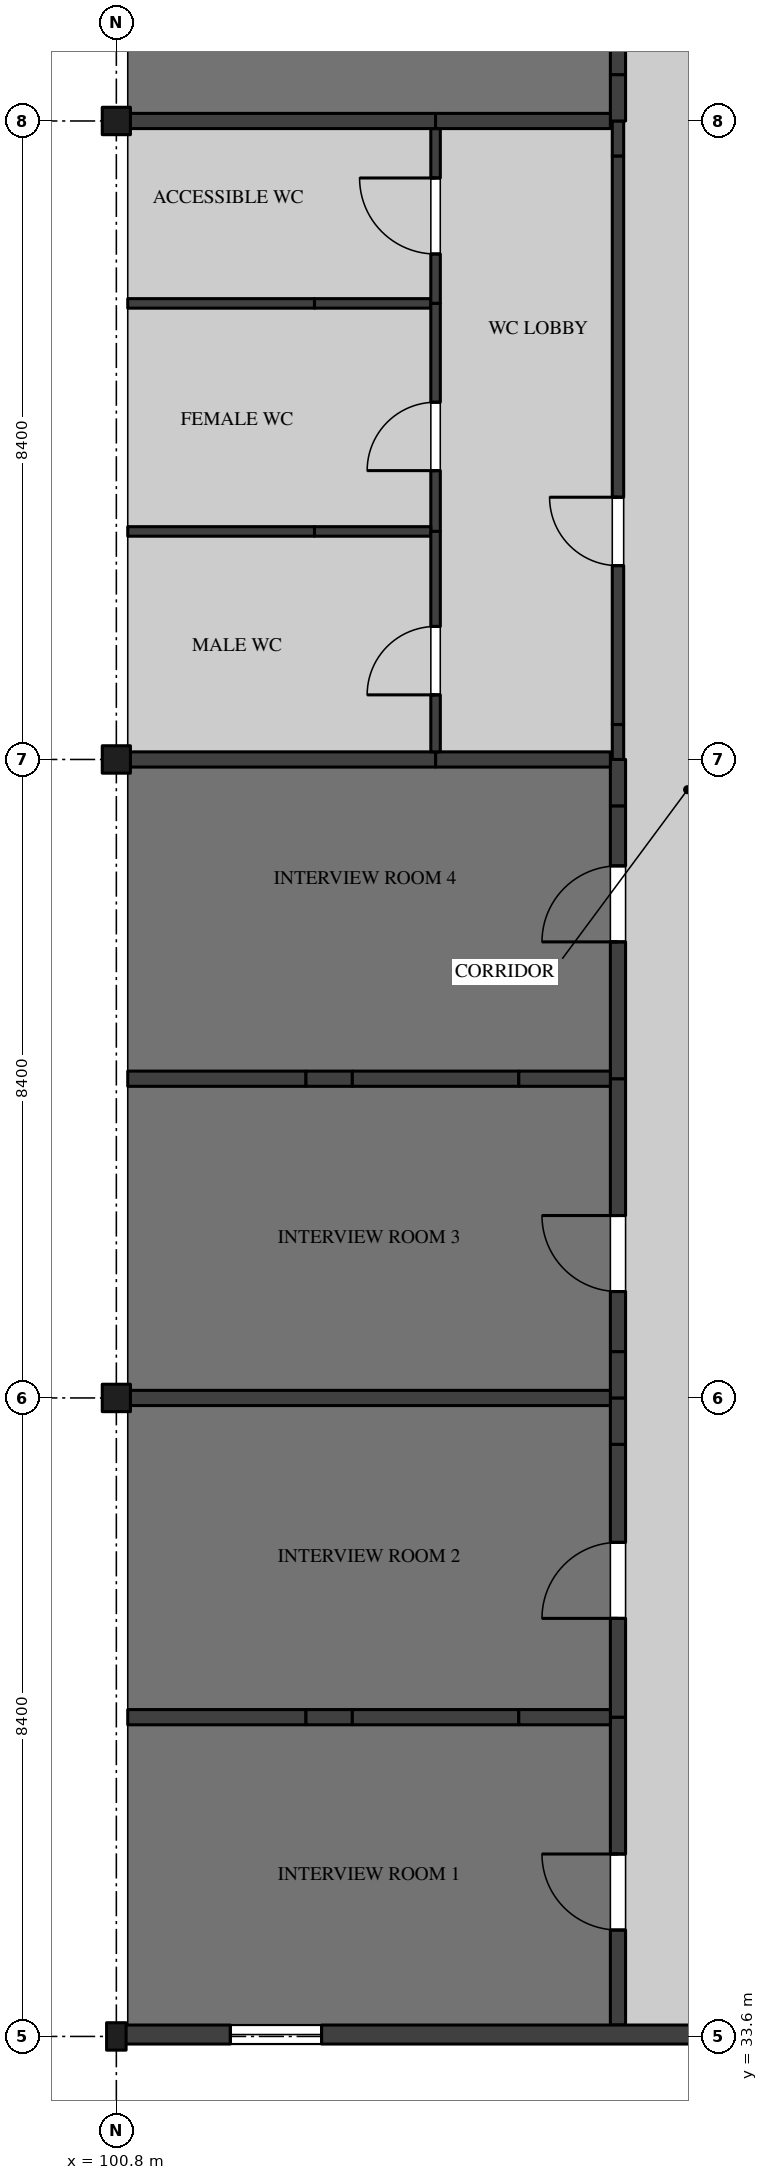
"""IFC4 building model, lengths in metres.
Left out: names, types, materials, properties, quantities, classifications, styles, units other than length and angle.
Written with IfcOpenShell. Run it as: python <this file> out.ifc"""

import sys

from ifc_helpers import new_model, si_unit, direction, frame, frame_2d, origin, origin_2d, place, context, subcontext, project, spatial, rectangle, i_section, extrude, element, fill, save


model = new_model("IFC4")
c1 = context("Model", 3, precision=1e-05, world=origin(), true_north=direction((0.0, 1.0)))
c2 = subcontext(c1, "Body", "Model", "MODEL_VIEW")
j1 = project(units=[si_unit("LENGTHUNIT", "METRE"), si_unit("PLANEANGLEUNIT", "RADIAN")], contexts=[c1])
p1 = place(None, origin())
s1 = spatial("IfcSite", under=j1, at=p1, CompositionType="ELEMENT")
p2 = place(p1, origin())
s2 = spatial("IfcBuilding", under=s1, at=p2, CompositionType="ELEMENT")
p3 = place(p2, frame((0.0, 0.0, 32.4)))
s3 = spatial("IfcBuildingStorey", under=s2, at=p3, CompositionType="ELEMENT", Elevation=32.4)
p4 = place(p3, frame((100.8, 33.6, 0.0), z_axis=(0.0, 0.0, 1.0), x_axis=(1.0, 0.0, 0.0)))
e1 = element("IfcColumn", 1, at=p4, inside=s3, PredefinedType="COLUMN", context=c2, shape_type="SweptSolid", body=[
    extrude(i_section(OverallWidth=0.257, OverallDepth=0.361, WebThickness=0.011, FlangeThickness=0.02, FilletRadius=0.015, at=origin_2d()), origin(), (0.0, 0.0, 1.0), 4.37),
])
for number, where, z_axis, x_axis in (
    (2, (100.8, 42.0, 0.0), (0.0, 0.0, 1.0), (1.0, 0.0, 0.0)),
    (3, (100.8, 50.4, 0.0), (0.0, 0.0, 1.0), (1.0, 0.0, 0.0)),
    (4, (100.8, 58.8, 0.0), (0.0, 0.0, 1.0), (1.0, 0.0, 0.0)),
):
    element("IfcColumn", number, at=place(p3, frame(where, z_axis=z_axis, x_axis=x_axis)), inside=s3, PredefinedType="COLUMN", context=c2, shape_type="SweptSolid", body=[
        extrude(i_section(OverallWidth=0.371, OverallDepth=0.361, WebThickness=0.012, FlangeThickness=0.02, FilletRadius=0.015, at=origin_2d()), origin(), (0.0, 0.0, 1.0), 4.37),
    ])
p5 = place(p3, frame((107.4, 33.75, 0.0), z_axis=(0.0, 0.0, 1.0), x_axis=(0.0, 1.0, 0.0)))
e5 = element("IfcWall", 5, at=p5, inside=s3, PredefinedType="PARTITIONING", context=c2, shape_type="SweptSolid", body=[
    extrude(rectangle(XDim=4.05, YDim=0.2, at=frame_2d((2.025, 0.0))), origin(), (0.0, 0.0, 1.0), 4.37),
])
p6 = place(p5, frame((1.25, 0.0, 0.0)))
e6 = element("IfcOpeningElement", 6, at=p6, cuts=e5, PredefinedType="OPENING", context=c2, shape_type="SweptSolid", body=[
    extrude(rectangle(XDim=1.0, YDim=2.1, at=frame_2d((0.5, 1.05))), frame((0.0, 0.11, 0.0), z_axis=(0.0, -1.0, 0.0), x_axis=(1.0, 0.0, 0.0)), (0.0, 0.0, 1.0), 0.22),
])
p7 = place(p3, frame((107.4, 37.8, 0.0), z_axis=(0.0, 0.0, 1.0), x_axis=(0.0, 1.0, 0.0)))
e7 = element("IfcWall", 7, at=p7, inside=s3, PredefinedType="PARTITIONING", context=c2, shape_type="SweptSolid", body=[
    extrude(rectangle(XDim=3.59, YDim=0.2, at=frame_2d((1.795, 0.0))), origin(), (0.0, 0.0, 1.0), 4.37),
])
p8 = place(p7, frame((1.3, 0.0, 0.0)))
e8 = element("IfcOpeningElement", 8, at=p8, cuts=e7, PredefinedType="OPENING", context=c2, shape_type="SweptSolid", body=[
    extrude(rectangle(XDim=1.0, YDim=2.1, at=frame_2d((0.5, 1.05))), frame((0.0, 0.11, 0.0), z_axis=(0.0, -1.0, 0.0), x_axis=(1.0, 0.0, 0.0)), (0.0, 0.0, 1.0), 0.22),
])
for number, where, z_axis, x_axis in (
    (9, (107.4, 41.39, 0.0), (0.0, 0.0, 1.0), (0.0, 1.0, 0.0)),
    (10, (107.4, 42.0, 0.0), (0.0, 0.0, 1.0), (0.0, 1.0, 0.0)),
):
    element("IfcWall", number, at=place(p3, frame(where, z_axis=z_axis, x_axis=x_axis)), inside=s3, PredefinedType="PARTITIONING", context=c2, shape_type="SweptSolid", body=[
        extrude(rectangle(XDim=0.61, YDim=0.2, at=frame_2d((0.305, 0.0))), origin(), (0.0, 0.0, 1.0), 3.746),
    ])
p9 = place(p3, frame((107.4, 42.61, 0.0), z_axis=(0.0, 0.0, 1.0), x_axis=(0.0, 1.0, 0.0)))
e11 = element("IfcWall", 11, at=p9, inside=s3, PredefinedType="PARTITIONING", context=c2, shape_type="SweptSolid", body=[
    extrude(rectangle(XDim=3.59, YDim=0.2, at=frame_2d((1.795, 0.0))), origin(), (0.0, 0.0, 1.0), 4.37),
])
p10 = place(p9, frame((0.79, 0.0, 0.0)))
e12 = element("IfcOpeningElement", 12, at=p10, cuts=e11, PredefinedType="OPENING", context=c2, shape_type="SweptSolid", body=[
    extrude(rectangle(XDim=1.0, YDim=2.1, at=frame_2d((0.5, 1.05))), frame((0.0, 0.11, 0.0), z_axis=(0.0, -1.0, 0.0), x_axis=(1.0, 0.0, 0.0)), (0.0, 0.0, 1.0), 0.22),
])
p11 = place(p3, frame((107.4, 46.2, 0.0), z_axis=(0.0, 0.0, 1.0), x_axis=(0.0, 1.0, 0.0)))
e13 = element("IfcWall", 13, at=p11, inside=s3, PredefinedType="PARTITIONING", context=c2, shape_type="SweptSolid", body=[
    extrude(rectangle(XDim=3.59, YDim=0.2, at=frame_2d((1.795, 0.0))), origin(), (0.0, 0.0, 1.0), 4.37),
])
p12 = place(p11, frame((1.8, 0.0, 0.0)))
e14 = element("IfcOpeningElement", 14, at=p12, cuts=e13, PredefinedType="OPENING", context=c2, shape_type="SweptSolid", body=[
    extrude(rectangle(XDim=1.0, YDim=2.1, at=frame_2d((0.5, 1.05))), frame((0.0, 0.11, 0.0), z_axis=(0.0, -1.0, 0.0), x_axis=(1.0, 0.0, 0.0)), (0.0, 0.0, 1.0), 0.22),
])
p13 = place(p3, frame((107.4, 49.79, 0.0), z_axis=(0.0, 0.0, 1.0), x_axis=(0.0, 1.0, 0.0)))
e15 = element("IfcWall", 15, at=p13, inside=s3, PredefinedType="PARTITIONING", context=c2, shape_type="SweptSolid", body=[
    extrude(rectangle(XDim=0.61, YDim=0.2, at=frame_2d((0.305, 0.0))), origin(), (0.0, 0.0, 1.0), 3.746),
])
p14 = place(p3, frame((107.4, 50.4, 0.0), z_axis=(0.0, 0.0, 1.0), x_axis=(0.0, 1.0, 0.0)))
e16 = element("IfcWall", 16, at=p14, inside=s3, PredefinedType="PARTITIONING", context=c2, shape_type="SweptSolid", body=[
    extrude(rectangle(XDim=0.46, YDim=0.15, at=frame_2d((0.23, 0.0))), origin(), (0.0, 0.0, 1.0), 3.746),
])
p15 = place(p3, frame((107.4, 50.86, 0.0), z_axis=(0.0, 0.0, 1.0), x_axis=(0.0, 1.0, 0.0)))
e17 = element("IfcWall", 17, at=p15, inside=s3, PredefinedType="PARTITIONING", context=c2, shape_type="SweptSolid", body=[
    extrude(rectangle(XDim=7.48, YDim=0.15, at=frame_2d((3.74, 0.0))), origin(), (0.0, 0.0, 1.0), 4.37),
])
p16 = place(p15, frame((2.09, 0.0, 0.0)))
e18 = element("IfcOpeningElement", 18, at=p16, cuts=e17, PredefinedType="OPENING", context=c2, shape_type="SweptSolid", body=[
    extrude(rectangle(XDim=0.9, YDim=2.1, at=frame_2d((0.45, 1.05))), frame((0.0, 0.085, 0.0), z_axis=(0.0, -1.0, 0.0), x_axis=(1.0, 0.0, 0.0)), (0.0, 0.0, 1.0), 0.17),
])
p17 = place(p3, frame((107.4, 58.34, 0.0), z_axis=(0.0, 0.0, 1.0), x_axis=(0.0, 1.0, 0.0)))
e19 = element("IfcWall", 19, at=p17, inside=s3, PredefinedType="PARTITIONING", context=c2, shape_type="SweptSolid", body=[
    extrude(rectangle(XDim=0.46, YDim=0.15, at=frame_2d((0.23, 0.0))), origin(), (0.0, 0.0, 1.0), 3.746),
])
p18 = place(p3, frame((107.4, 58.8, 0.0), z_axis=(0.0, 0.0, 1.0), x_axis=(0.0, 1.0, 0.0)))
e20 = element("IfcWall", 20, at=p18, inside=s3, PredefinedType="PARTITIONING", context=c2, shape_type="SweptSolid", body=[
    extrude(rectangle(XDim=0.61, YDim=0.2, at=frame_2d((0.305, 0.0))), origin(), (0.0, 0.0, 1.0), 3.746),
])
p19 = place(p3, frame((107.4, 59.41, 0.0), z_axis=(0.0, 0.0, 1.0), x_axis=(0.0, 1.0, 0.0)))
e21 = element("IfcWall", 21, at=p19, inside=s3, PredefinedType="PARTITIONING", context=c2, shape_type="SweptSolid", body=[
    extrude(rectangle(XDim=7.64, YDim=0.2, at=frame_2d((3.82, 0.0))), origin(), (0.0, 0.0, 1.0), 4.37),
])
p20 = place(p19, frame((3.09, 0.0, 0.0)))
e22 = element("IfcOpeningElement", 22, at=p20, cuts=e21, PredefinedType="OPENING", context=c2, shape_type="SweptSolid", body=[
    extrude(rectangle(XDim=1.0, YDim=2.1, at=frame_2d((0.5, 1.05))), frame((0.0, 0.11, 0.0), z_axis=(0.0, -1.0, 0.0), x_axis=(1.0, 0.0, 0.0)), (0.0, 0.0, 1.0), 0.22),
])
p21 = place(p3, frame((100.95, 37.8, 0.0), z_axis=(0.0, 0.0, 1.0), x_axis=(1.0, 0.0, 0.0)))
e23 = element("IfcWall", 23, at=p21, inside=s3, PredefinedType="PARTITIONING", context=c2, shape_type="SweptSolid", body=[
    extrude(rectangle(XDim=2.345, YDim=0.2, at=frame_2d((1.172, 0.0))), origin(), (0.0, 0.0, 1.0), 4.37),
])
p22 = place(p3, frame((103.295, 37.8, 0.0), z_axis=(0.0, 0.0, 1.0), x_axis=(1.0, 0.0, 0.0)))
e24 = element("IfcWall", 24, at=p22, inside=s3, PredefinedType="PARTITIONING", context=c2, shape_type="SweptSolid", body=[
    extrude(rectangle(XDim=0.61, YDim=0.2, at=frame_2d((0.305, 0.0))), origin(), (0.0, 0.0, 1.0), 3.895),
])
p23 = place(p3, frame((103.905, 37.8, 0.0), z_axis=(0.0, 0.0, 1.0), x_axis=(1.0, 0.0, 0.0)))
e25 = element("IfcWall", 25, at=p23, inside=s3, PredefinedType="PARTITIONING", context=c2, shape_type="SweptSolid", body=[
    extrude(rectangle(XDim=2.19, YDim=0.2, at=frame_2d((1.095, 0.0))), origin(), (0.0, 0.0, 1.0), 4.37),
])
p24 = place(p3, frame((106.095, 37.8, 0.0), z_axis=(0.0, 0.0, 1.0), x_axis=(1.0, 0.0, 0.0)))
e26 = element("IfcWall", 26, at=p24, inside=s3, PredefinedType="PARTITIONING", context=c2, shape_type="SweptSolid", body=[
    extrude(rectangle(XDim=1.205, YDim=0.2, at=frame_2d((0.603, 0.0))), origin(), (0.0, 0.0, 1.0), 3.895),
])
p25 = place(p3, frame((100.986, 42.0, 0.0), z_axis=(0.0, 0.0, 1.0), x_axis=(1.0, 0.0, 0.0)))
e27 = element("IfcWall", 27, at=p25, inside=s3, PredefinedType="PARTITIONING", context=c2, shape_type="SweptSolid", body=[
    extrude(rectangle(XDim=6.314, YDim=0.2, at=frame_2d((3.157, 0.0))), origin(), (0.0, 0.0, 1.0), 3.746),
])
p26 = place(p3, frame((100.95, 46.2, 0.0), z_axis=(0.0, 0.0, 1.0), x_axis=(1.0, 0.0, 0.0)))
e28 = element("IfcWall", 28, at=p26, inside=s3, PredefinedType="PARTITIONING", context=c2, shape_type="SweptSolid", body=[
    extrude(rectangle(XDim=2.345, YDim=0.2, at=frame_2d((1.172, 0.0))), origin(), (0.0, 0.0, 1.0), 4.37),
])
p27 = place(p3, frame((103.295, 46.2, 0.0), z_axis=(0.0, 0.0, 1.0), x_axis=(1.0, 0.0, 0.0)))
e29 = element("IfcWall", 29, at=p27, inside=s3, PredefinedType="PARTITIONING", context=c2, shape_type="SweptSolid", body=[
    extrude(rectangle(XDim=0.61, YDim=0.2, at=frame_2d((0.305, 0.0))), origin(), (0.0, 0.0, 1.0), 3.895),
])
p28 = place(p3, frame((103.905, 46.2, 0.0), z_axis=(0.0, 0.0, 1.0), x_axis=(1.0, 0.0, 0.0)))
e30 = element("IfcWall", 30, at=p28, inside=s3, PredefinedType="PARTITIONING", context=c2, shape_type="SweptSolid", body=[
    extrude(rectangle(XDim=2.19, YDim=0.2, at=frame_2d((1.095, 0.0))), origin(), (0.0, 0.0, 1.0), 4.37),
])
p29 = place(p3, frame((106.095, 46.2, 0.0), z_axis=(0.0, 0.0, 1.0), x_axis=(1.0, 0.0, 0.0)))
e31 = element("IfcWall", 31, at=p29, inside=s3, PredefinedType="PARTITIONING", context=c2, shape_type="SweptSolid", body=[
    extrude(rectangle(XDim=1.205, YDim=0.2, at=frame_2d((0.603, 0.0))), origin(), (0.0, 0.0, 1.0), 3.895),
])
p30 = place(p3, frame((105.0, 50.4, 0.0), z_axis=(0.0, 0.0, 1.0), x_axis=(1.0, 0.0, 0.0)))
e32 = element("IfcWall", 32, at=p30, inside=s3, PredefinedType="PARTITIONING", context=c2, shape_type="SweptSolid", body=[
    extrude(rectangle(XDim=2.3, YDim=0.2, at=frame_2d((1.15, 0.0))), origin(), (0.0, 0.0, 1.0), 3.746),
])
p31 = place(p3, frame((100.986, 50.4, 0.0), z_axis=(0.0, 0.0, 1.0), x_axis=(1.0, 0.0, 0.0)))
e33 = element("IfcWall", 33, at=p31, inside=s3, PredefinedType="PARTITIONING", context=c2, shape_type="SweptSolid", body=[
    extrude(rectangle(XDim=4.014, YDim=0.2, at=frame_2d((2.007, 0.0))), origin(), (0.0, 0.0, 1.0), 3.746),
])
p32 = place(p3, frame((100.95, 56.4, 0.0), z_axis=(0.0, 0.0, 1.0), x_axis=(1.0, 0.0, 0.0)))
e34 = element("IfcWall", 34, at=p32, inside=s3, PredefinedType="PARTITIONING", context=c2, shape_type="SweptSolid", body=[
    extrude(rectangle(XDim=2.457, YDim=0.125, at=frame_2d((1.229, 0.0))), origin(), (0.0, 0.0, 1.0), 4.37),
])
p33 = place(p3, frame((103.407, 56.4, 0.0), z_axis=(0.0, 0.0, 1.0), x_axis=(1.0, 0.0, 0.0)))
e35 = element("IfcWall", 35, at=p33, inside=s3, PredefinedType="PARTITIONING", context=c2, shape_type="SweptSolid", body=[
    extrude(rectangle(XDim=1.531, YDim=0.125, at=frame_2d((0.766, 0.0))), origin(), (0.0, 0.0, 1.0), 3.895),
])
p34 = place(p3, frame((105.0, 56.4, 0.0), z_axis=(0.0, 0.0, 1.0), x_axis=(0.0, 1.0, 0.0)))
e36 = element("IfcWall", 36, at=p34, inside=s3, PredefinedType="PARTITIONING", context=c2, shape_type="SweptSolid", body=[
    extrude(rectangle(XDim=2.3, YDim=0.125, at=frame_2d((1.15, 0.0))), origin(), (0.0, 0.0, 1.0), 4.37),
])
p35 = place(p34, frame((0.65, 0.0, 0.0)))
e37 = element("IfcOpeningElement", 37, at=p35, cuts=e36, PredefinedType="OPENING", context=c2, shape_type="SweptSolid", body=[
    extrude(rectangle(XDim=1.0, YDim=2.1, at=frame_2d((0.5, 1.05))), frame((0.0, 0.073, 0.0), z_axis=(0.0, -1.0, 0.0), x_axis=(1.0, 0.0, 0.0)), (0.0, 0.0, 1.0), 0.145),
])
p36 = place(p3, frame((100.986, 58.8, 0.0), z_axis=(0.0, 0.0, 1.0), x_axis=(1.0, 0.0, 0.0)))
e38 = element("IfcWall", 38, at=p36, inside=s3, PredefinedType="PARTITIONING", context=c2, shape_type="SweptSolid", body=[
    extrude(rectangle(XDim=4.014, YDim=0.2, at=frame_2d((2.007, 0.0))), origin(), (0.0, 0.0, 1.0), 3.746),
])
p37 = place(p3, frame((105.0, 53.4, 0.0), z_axis=(0.0, 0.0, 1.0), x_axis=(0.0, 1.0, 0.0)))
e39 = element("IfcWall", 39, at=p37, inside=s3, PredefinedType="PARTITIONING", context=c2, shape_type="SweptSolid", body=[
    extrude(rectangle(XDim=3.0, YDim=0.125, at=frame_2d((1.5, 0.0))), origin(), (0.0, 0.0, 1.0), 4.37),
])
p38 = place(p37, frame((0.8, 0.0, 0.0)))
e40 = element("IfcOpeningElement", 40, at=p38, cuts=e39, PredefinedType="OPENING", context=c2, shape_type="SweptSolid", body=[
    extrude(rectangle(XDim=0.9, YDim=2.1, at=frame_2d((0.45, 1.05))), frame((0.0, 0.073, 0.0), z_axis=(0.0, -1.0, 0.0), x_axis=(1.0, 0.0, 0.0)), (0.0, 0.0, 1.0), 0.145),
])
p39 = place(p3, frame((100.95, 53.4, 0.0), z_axis=(0.0, 0.0, 1.0), x_axis=(1.0, 0.0, 0.0)))
e41 = element("IfcWall", 41, at=p39, inside=s3, PredefinedType="PARTITIONING", context=c2, shape_type="SweptSolid", body=[
    extrude(rectangle(XDim=2.457, YDim=0.125, at=frame_2d((1.229, 0.0))), origin(), (0.0, 0.0, 1.0), 4.37),
])
p40 = place(p3, frame((103.407, 53.4, 0.0), z_axis=(0.0, 0.0, 1.0), x_axis=(1.0, 0.0, 0.0)))
e42 = element("IfcWall", 42, at=p40, inside=s3, PredefinedType="PARTITIONING", context=c2, shape_type="SweptSolid", body=[
    extrude(rectangle(XDim=1.531, YDim=0.125, at=frame_2d((0.766, 0.0))), origin(), (0.0, 0.0, 1.0), 3.895),
])
p41 = place(p3, frame((105.0, 50.5, 0.0), z_axis=(0.0, 0.0, 1.0), x_axis=(0.0, 1.0, 0.0)))
e43 = element("IfcWall", 43, at=p41, inside=s3, PredefinedType="PARTITIONING", context=c2, shape_type="SweptSolid", body=[
    extrude(rectangle(XDim=2.9, YDim=0.125, at=frame_2d((1.45, 0.0))), origin(), (0.0, 0.0, 1.0), 4.37),
])
p42 = place(p41, frame((0.75, 0.0, 0.0)))
e44 = element("IfcOpeningElement", 44, at=p42, cuts=e43, PredefinedType="OPENING", context=c2, shape_type="SweptSolid", body=[
    extrude(rectangle(XDim=0.9, YDim=2.1, at=frame_2d((0.45, 1.05))), frame((0.0, 0.073, 0.0), z_axis=(0.0, -1.0, 0.0), x_axis=(1.0, 0.0, 0.0)), (0.0, 0.0, 1.0), 0.145),
])
p43 = place(p3, frame((105.0, 58.8, 0.0), z_axis=(0.0, 0.0, 1.0), x_axis=(1.0, 0.0, 0.0)))
e45 = element("IfcWall", 45, at=p43, inside=s3, PredefinedType="PARTITIONING", context=c2, shape_type="SweptSolid", body=[
    extrude(rectangle(XDim=2.3, YDim=0.2, at=frame_2d((1.15, 0.0))), origin(), (0.0, 0.0, 1.0), 3.746),
])
p44 = place(p3, frame((100.804, 33.625, 0.0), z_axis=(0.0, 0.0, 1.0), x_axis=(1.0, 0.0, 0.0)))
e46 = element("IfcWall", 46, at=p44, inside=s3, PredefinedType="SOLIDWALL", context=c2, shape_type="SweptSolid", body=[
    extrude(rectangle(XDim=8.196, YDim=0.25, at=frame_2d((4.098, 0.0))), origin(), (0.0, 0.0, 1.0), 3.746),
])
p45 = place(p44, frame((1.496, 0.0, 2.1)))
e47 = element("IfcOpeningElement", 47, at=p45, cuts=e46, PredefinedType="OPENING", context=c2, shape_type="SweptSolid", body=[
    extrude(rectangle(XDim=1.2, YDim=0.45, at=frame_2d((0.6, 0.225))), frame((0.0, 0.135, 0.0), z_axis=(0.0, -1.0, 0.0), x_axis=(1.0, 0.0, 0.0)), (0.0, 0.0, 1.0), 0.27),
])
p46 = place(p6, origin())
e48 = element("IfcDoor", 48, at=p46, inside=s3, OperationType="SINGLE_SWING_LEFT", PredefinedType="DOOR", context=c2, shape_type="SweptSolid", body=[
    extrude(rectangle(XDim=1.0, YDim=2.1, at=frame_2d((0.5, 1.05))), frame((0.0, 0.045, 0.0), z_axis=(0.0, -1.0, 0.0), x_axis=(1.0, 0.0, 0.0)), (0.0, 0.0, 1.0), 0.09),
])
fill(e6, e48)
p47 = place(p8, origin())
e49 = element("IfcDoor", 49, at=p47, inside=s3, OperationType="SINGLE_SWING_RIGHT", PredefinedType="DOOR", context=c2, shape_type="SweptSolid", body=[
    extrude(rectangle(XDim=1.0, YDim=2.1, at=frame_2d((0.5, 1.05))), frame((0.0, 0.045, 0.0), z_axis=(0.0, -1.0, 0.0), x_axis=(1.0, 0.0, 0.0)), (0.0, 0.0, 1.0), 0.09),
])
fill(e8, e49)
p48 = place(p10, origin())
e50 = element("IfcDoor", 50, at=p48, inside=s3, OperationType="SINGLE_SWING_LEFT", PredefinedType="DOOR", context=c2, shape_type="SweptSolid", body=[
    extrude(rectangle(XDim=1.0, YDim=2.1, at=frame_2d((0.5, 1.05))), frame((0.0, 0.045, 0.0), z_axis=(0.0, -1.0, 0.0), x_axis=(1.0, 0.0, 0.0)), (0.0, 0.0, 1.0), 0.09),
])
fill(e12, e50)
p49 = place(p12, origin())
e51 = element("IfcDoor", 51, at=p49, inside=s3, OperationType="SINGLE_SWING_RIGHT", PredefinedType="DOOR", context=c2, shape_type="SweptSolid", body=[
    extrude(rectangle(XDim=1.0, YDim=2.1, at=frame_2d((0.5, 1.05))), frame((0.0, 0.045, 0.0), z_axis=(0.0, -1.0, 0.0), x_axis=(1.0, 0.0, 0.0)), (0.0, 0.0, 1.0), 0.09),
])
fill(e14, e51)
p50 = place(p35, origin())
e52 = element("IfcDoor", 52, at=p50, inside=s3, OperationType="SINGLE_SWING_LEFT", PredefinedType="DOOR", context=c2, shape_type="SweptSolid", body=[
    extrude(rectangle(XDim=1.0, YDim=2.1, at=frame_2d((0.5, 1.05))), frame((0.0, 0.02, 0.0), z_axis=(0.0, -1.0, 0.0), x_axis=(1.0, 0.0, 0.0)), (0.0, 0.0, 1.0), 0.04),
])
fill(e37, e52)
p51 = place(p38, origin())
e53 = element("IfcDoor", 53, at=p51, inside=s3, OperationType="SINGLE_SWING_RIGHT", PredefinedType="DOOR", context=c2, shape_type="SweptSolid", body=[
    extrude(rectangle(XDim=0.9, YDim=2.1, at=frame_2d((0.45, 1.05))), frame((0.0, 0.02, 0.0), z_axis=(0.0, -1.0, 0.0), x_axis=(1.0, 0.0, 0.0)), (0.0, 0.0, 1.0), 0.04),
])
fill(e40, e53)
p52 = place(p16, origin())
e54 = element("IfcDoor", 54, at=p52, inside=s3, OperationType="SINGLE_SWING_LEFT", PredefinedType="DOOR", context=c2, shape_type="SweptSolid", body=[
    extrude(rectangle(XDim=0.9, YDim=2.1, at=frame_2d((0.45, 1.05))), frame((0.0, 0.025, 0.0), z_axis=(0.0, -1.0, 0.0), x_axis=(1.0, 0.0, 0.0)), (0.0, 0.0, 1.0), 0.05),
])
fill(e18, e54)
p53 = place(p42, origin())
e55 = element("IfcDoor", 55, at=p53, inside=s3, OperationType="SINGLE_SWING_RIGHT", PredefinedType="DOOR", context=c2, shape_type="SweptSolid", body=[
    extrude(rectangle(XDim=0.9, YDim=2.1, at=frame_2d((0.45, 1.05))), frame((0.0, 0.02, 0.0), z_axis=(0.0, -1.0, 0.0), x_axis=(1.0, 0.0, 0.0)), (0.0, 0.0, 1.0), 0.04),
])
fill(e44, e55)
p54 = place(p45, origin())
e56 = element("IfcWindow", 56, at=p54, inside=s3, PartitioningType="SINGLE_PANEL", PredefinedType="WINDOW", context=c2, shape_type="SweptSolid", body=[
    extrude(rectangle(XDim=1.2, YDim=0.45, at=frame_2d((0.6, 0.225))), frame((0.0, 0.05, 0.0), z_axis=(0.0, -1.0, 0.0), x_axis=(1.0, 0.0, 0.0)), (0.0, 0.0, 1.0), 0.1),
])
fill(e47, e56)
save(model, sys.argv[1])
